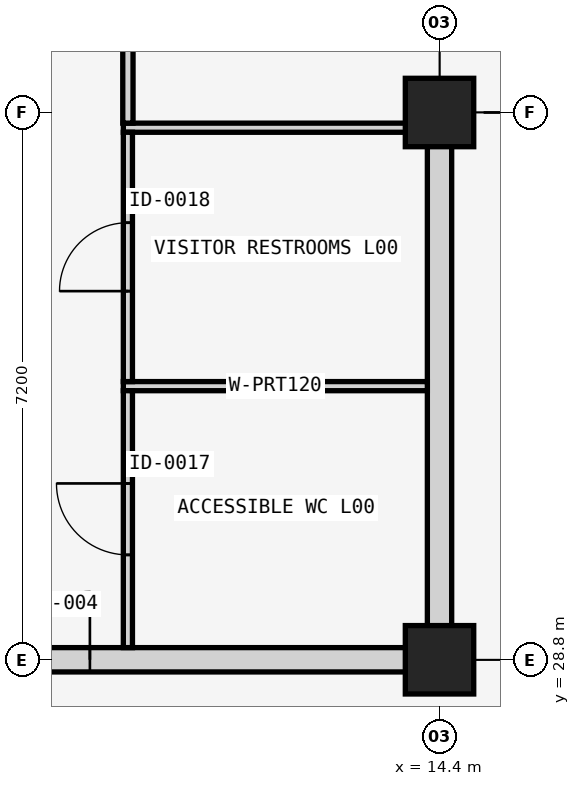
"""IFC4 building model, lengths in metres.
Left out: names, types, materials, properties, quantities, classifications, styles, units other than length and angle.
Written with IfcOpenShell. Run it as: python <this file> out.ifc"""

import sys

from ifc_helpers import new_model, si_unit, direction, frame, frame_2d, origin, origin_2d, place, context, subcontext, project, spatial, rectangle, extrude, element, fill, save


model = new_model("IFC4")
c1 = context("Model", 3, precision=1e-05, world=origin(), true_north=direction((0.0, 1.0)))
c2 = subcontext(c1, "Body", "Model", "MODEL_VIEW")
j1 = project(units=[si_unit("LENGTHUNIT", "METRE"), si_unit("PLANEANGLEUNIT", "RADIAN")], contexts=[c1])
p1 = place(None, origin())
s1 = spatial("IfcSite", under=j1, at=p1, CompositionType="ELEMENT")
p2 = place(p1, origin())
s2 = spatial("IfcBuilding", under=s1, at=p2, CompositionType="ELEMENT")
p3 = place(p2, origin())
s3 = spatial("IfcBuildingStorey", under=s2, at=p3, CompositionType="ELEMENT", Elevation=0.0)
for number, where, z_axis, x_axis in (
    (1, (14.4, 28.8, 0.0), (0.0, 0.0, 1.0), (1.0, 0.0, 0.0)),
    (2, (14.4, 36.0, 0.0), (0.0, 0.0, 1.0), (1.0, 0.0, 0.0)),
):
    element("IfcColumn", number, at=place(p3, frame(where, z_axis=z_axis, x_axis=x_axis)), inside=s3, PredefinedType="COLUMN", context=c2, shape_type="SweptSolid", body=[
        extrude(rectangle(XDim=0.9, YDim=0.9, at=origin_2d()), origin(), (0.0, 0.0, 1.0), 4.8),
    ])
p4 = place(p3, frame((1.8, 28.8, 0.0), z_axis=(0.0, 0.0, 1.0), x_axis=(1.0, 0.0, 0.0)))
e3 = element("IfcWall", 3, at=p4, inside=s3, PredefinedType="SOLIDWALL", context=c2, shape_type="SweptSolid", body=[
    extrude(rectangle(XDim=12.16, YDim=0.32, at=frame_2d((6.08, 0.0))), origin(), (0.0, 0.0, 1.0), 3.45),
])
p5 = place(p4, frame((6.2, 0.0, 0.0)))
e4 = element("IfcOpeningElement", 4, at=p5, cuts=e3, PredefinedType="OPENING", context=c2, shape_type="SweptSolid", body=[
    extrude(rectangle(XDim=1.8, YDim=2.4, at=frame_2d((0.9, 1.2))), frame((0.0, 0.17, 0.0), z_axis=(0.0, -1.0, 0.0), x_axis=(1.0, 0.0, 0.0)), (0.0, 0.0, 1.0), 0.34),
])
p6 = place(p3, frame((14.4, 29.24, 0.0), z_axis=(0.0, 0.0, 1.0), x_axis=(0.0, 1.0, 0.0)))
e5 = element("IfcWall", 5, at=p6, inside=s3, PredefinedType="SOLIDWALL", context=c2, shape_type="SweptSolid", body=[
    extrude(rectangle(XDim=6.32, YDim=0.32, at=frame_2d((3.16, 0.0))), origin(), (0.0, 0.0, 1.0), 3.45),
])
p7 = place(p3, frame((10.24, 32.4, 0.0), z_axis=(0.0, 0.0, 1.0), x_axis=(1.0, 0.0, 0.0)))
e6 = element("IfcWall", 6, at=p7, inside=s3, PredefinedType="PARTITIONING", context=c2, shape_type="SweptSolid", body=[
    extrude(rectangle(XDim=4.0, YDim=0.12, at=frame_2d((2.0, 0.0))), origin(), (0.0, 0.0, 1.0), 3.45),
])
p8 = place(p3, frame((10.3, 28.96, 0.0), z_axis=(0.0, 0.0, 1.0), x_axis=(0.0, 1.0, 0.0)))
e7 = element("IfcWall", 7, at=p8, inside=s3, PredefinedType="PARTITIONING", context=c2, shape_type="SweptSolid", body=[
    extrude(rectangle(XDim=3.38, YDim=0.12, at=frame_2d((1.69, 0.0))), origin(), (0.0, 0.0, 1.0), 3.85),
])
p9 = place(p8, frame((1.22, 0.0, 0.0)))
e8 = element("IfcOpeningElement", 8, at=p9, cuts=e7, PredefinedType="OPENING", context=c2, shape_type="SweptSolid", body=[
    extrude(rectangle(XDim=0.94, YDim=2.1, at=frame_2d((0.47, 1.05))), frame((0.0, 0.07, 0.0), z_axis=(0.0, -1.0, 0.0), x_axis=(1.0, 0.0, 0.0)), (0.0, 0.0, 1.0), 0.14),
])
p10 = place(p3, frame((10.24, 35.8, 0.0), z_axis=(0.0, 0.0, 1.0), x_axis=(1.0, 0.0, 0.0)))
e9 = element("IfcWall", 9, at=p10, inside=s3, PredefinedType="PARTITIONING", context=c2, shape_type="SweptSolid", body=[
    extrude(rectangle(XDim=4.0, YDim=0.12, at=frame_2d((2.0, 0.0))), origin(), (0.0, 0.0, 1.0), 3.45),
])
p11 = place(p3, frame((10.3, 32.46, 0.0), z_axis=(0.0, 0.0, 1.0), x_axis=(0.0, 1.0, 0.0)))
e10 = element("IfcWall", 10, at=p11, inside=s3, PredefinedType="PARTITIONING", context=c2, shape_type="SweptSolid", body=[
    extrude(rectangle(XDim=3.28, YDim=0.12, at=frame_2d((1.64, 0.0))), origin(), (0.0, 0.0, 1.0), 4.45),
])
p12 = place(p11, frame((1.19, 0.0, 0.0)))
e11 = element("IfcOpeningElement", 11, at=p12, cuts=e10, PredefinedType="OPENING", context=c2, shape_type="SweptSolid", body=[
    extrude(rectangle(XDim=0.9, YDim=2.1, at=frame_2d((0.45, 1.05))), frame((0.0, 0.07, 0.0), z_axis=(0.0, -1.0, 0.0), x_axis=(1.0, 0.0, 0.0)), (0.0, 0.0, 1.0), 0.14),
])
p13 = place(p3, frame((10.3, 35.86, 0.0), z_axis=(0.0, 0.0, 1.0), x_axis=(0.0, 1.0, 0.0)))
e12 = element("IfcWall", 12, at=p13, inside=s3, PredefinedType="PARTITIONING", context=c2, shape_type="SweptSolid", body=[
    extrude(rectangle(XDim=28.672, YDim=0.135, at=frame_2d((14.336, 0.0))), origin(), (0.0, 0.0, 1.0), 3.85),
])
p14 = place(p13, frame((13.746, 0.0, 0.0)))
e13 = element("IfcOpeningElement", 13, at=p14, cuts=e12, PredefinedType="OPENING", context=c2, shape_type="SweptSolid", body=[
    extrude(rectangle(XDim=1.18, YDim=2.08, at=frame_2d((0.59, 1.04))), frame((0.0, 0.078, 0.0), z_axis=(0.0, -1.0, 0.0), x_axis=(1.0, 0.0, 0.0)), (0.0, 0.0, 1.0), 0.155),
])
p15 = place(p5, frame((1.8, 0.0, 0.0), z_axis=(0.0, 0.0, 1.0), x_axis=(-1.0, 0.0, 0.0)))
e14 = element("IfcDoor", 14, at=p15, inside=s3, OperationType="DOUBLE_DOOR_SINGLE_SWING", PredefinedType="DOOR", context=c2, shape_type="SweptSolid", body=[
    extrude(rectangle(XDim=1.8, YDim=2.4, at=frame_2d((0.9, 1.2))), frame((0.0, 0.025, 0.0), z_axis=(0.0, -1.0, 0.0), x_axis=(1.0, 0.0, 0.0)), (0.0, 0.0, 1.0), 0.05),
])
fill(e4, e14)
p16 = place(p9, origin())
e15 = element("IfcDoor", 15, at=p16, inside=s3, OperationType="SINGLE_SWING_RIGHT", PredefinedType="DOOR", context=c2, shape_type="SweptSolid", body=[
    extrude(rectangle(XDim=0.94, YDim=2.1, at=frame_2d((0.47, 1.05))), frame((0.0, 0.025, 0.0), z_axis=(0.0, -1.0, 0.0), x_axis=(1.0, 0.0, 0.0)), (0.0, 0.0, 1.0), 0.05),
])
fill(e8, e15)
p17 = place(p12, origin())
e16 = element("IfcDoor", 16, at=p17, inside=s3, OperationType="SINGLE_SWING_LEFT", PredefinedType="DOOR", context=c2, shape_type="SweptSolid", body=[
    extrude(rectangle(XDim=0.9, YDim=2.1, at=frame_2d((0.45, 1.05))), frame((0.0, 0.025, 0.0), z_axis=(0.0, -1.0, 0.0), x_axis=(1.0, 0.0, 0.0)), (0.0, 0.0, 1.0), 0.05),
])
fill(e11, e16)
save(model, sys.argv[1])
